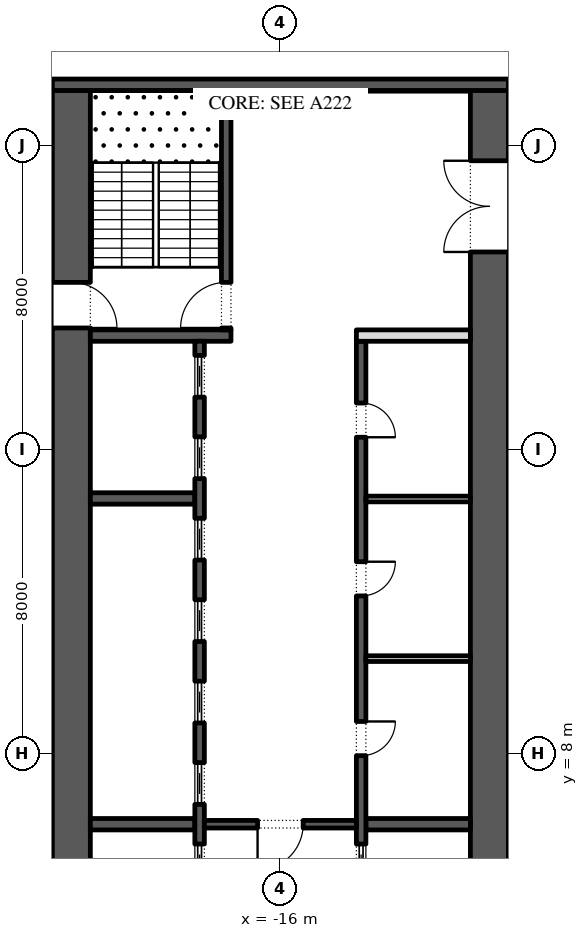
"""IFC4 building model, lengths in metres.
Left out: names, types, materials, properties, quantities, classifications, styles, units other than length and angle.
Written with IfcOpenShell. Run it as: python <this file> out.ifc"""

import sys

from ifc_helpers import new_model, si_unit, direction, frame, frame_2d, origin, place, context, subcontext, project, spatial, rectangle, extrude, element, fill, save


model = new_model("IFC4")
c1 = context("Model", 3, precision=1e-05, world=origin(), true_north=direction((0.0, 1.0)))
c2 = subcontext(c1, "Body", "Model", "MODEL_VIEW")
j1 = project(units=[si_unit("LENGTHUNIT", "METRE"), si_unit("PLANEANGLEUNIT", "RADIAN")], contexts=[c1])
p1 = place(None, origin())
s1 = spatial("IfcSite", under=j1, at=p1, CompositionType="ELEMENT")
p2 = place(p1, origin())
s2 = spatial("IfcBuilding", under=s1, at=p2, CompositionType="ELEMENT")
p3 = place(p2, frame((0.0, 0.0, 90.0)))
s3 = spatial("IfcBuildingStorey", under=s2, at=p3, CompositionType="ELEMENT", Elevation=90.0)
p4 = place(p3, frame((-21.5, -2.45, 0.0), z_axis=(0.0, 0.0, 1.0), x_axis=(0.0, 1.0, 0.0)))
e1 = element("IfcWall", 1, at=p4, inside=s3, PredefinedType="SHEAR", context=c2, shape_type="SweptSolid", body=[
    extrude(rectangle(XDim=27.9, YDim=1.0, at=frame_2d((13.95, 0.0))), origin(), (0.0, 0.0, 1.0), 3.9),
])
p5 = place(p4, frame((5.05, 0.0, 0.0)))
e2 = element("IfcOpeningElement", 2, at=p5, cuts=e1, PredefinedType="OPENING", context=c2, shape_type="SweptSolid", body=[
    extrude(rectangle(XDim=1.2, YDim=2.1, at=frame_2d((0.6, 1.05))), frame((0.0, 0.51, 0.0), z_axis=(0.0, -1.0, 0.0), x_axis=(1.0, 0.0, 0.0)), (0.0, 0.0, 1.0), 1.02),
])
p6 = place(p4, frame((21.65, 0.0, 0.0)))
e3 = element("IfcOpeningElement", 3, at=p6, cuts=e1, PredefinedType="OPENING", context=c2, shape_type="SweptSolid", body=[
    extrude(rectangle(XDim=1.2, YDim=2.1, at=frame_2d((0.6, 1.05))), frame((0.0, 0.51, 0.0), z_axis=(0.0, -1.0, 0.0), x_axis=(1.0, 0.0, 0.0)), (0.0, 0.0, 1.0), 1.02),
])
p7 = place(p3, frame((-10.5, -2.45, 0.0), z_axis=(0.0, 0.0, 1.0), x_axis=(0.0, 1.0, 0.0)))
e4 = element("IfcWall", 4, at=p7, inside=s3, PredefinedType="SHEAR", context=c2, shape_type="SweptSolid", body=[
    extrude(rectangle(XDim=27.9, YDim=1.0, at=frame_2d((13.95, 0.0))), origin(), (0.0, 0.0, 1.0), 3.9),
])
p8 = place(p7, frame((23.65, 0.0, 0.0)))
e5 = element("IfcOpeningElement", 5, at=p8, cuts=e4, PredefinedType="OPENING", context=c2, shape_type="SweptSolid", body=[
    extrude(rectangle(XDim=2.4, YDim=2.1, at=frame_2d((1.2, 1.05))), frame((0.0, 0.51, 0.0), z_axis=(0.0, -1.0, 0.0), x_axis=(1.0, 0.0, 0.0)), (0.0, 0.0, 1.0), 1.02),
])
p9 = place(p7, frame((0.788, 0.0, 0.0)))
e6 = element("IfcOpeningElement", 6, at=p9, cuts=e4, PredefinedType="OPENING", context=c2, shape_type="SweptSolid", body=[
    extrude(rectangle(XDim=0.9, YDim=2.1, at=frame_2d((0.45, 1.05))), frame((0.0, 0.51, 0.0), z_axis=(0.0, -1.0, 0.0), x_axis=(1.0, 0.0, 0.0)), (0.0, 0.0, 1.0), 1.02),
])
p10 = place(p7, frame((4.012, 0.0, 0.0)))
e7 = element("IfcOpeningElement", 7, at=p10, cuts=e4, PredefinedType="OPENING", context=c2, shape_type="SweptSolid", body=[
    extrude(rectangle(XDim=0.9, YDim=2.1, at=frame_2d((0.45, 1.05))), frame((0.0, 0.51, 0.0), z_axis=(0.0, -1.0, 0.0), x_axis=(1.0, 0.0, 0.0)), (0.0, 0.0, 1.0), 1.02),
])
p11 = place(p3, frame((-22.0, 25.6, 0.0), z_axis=(0.0, 0.0, 1.0), x_axis=(1.0, 0.0, 0.0)))
e8 = element("IfcWall", 8, at=p11, inside=s3, PredefinedType="SHEAR", context=c2, shape_type="SweptSolid", body=[
    extrude(rectangle(XDim=12.0, YDim=0.3, at=frame_2d((6.0, 0.0))), origin(), (0.0, 0.0, 1.0), 3.9),
])
p12 = place(p3, frame((-21.0, 19.0, 0.0), z_axis=(0.0, 0.0, 1.0), x_axis=(1.0, 0.0, 0.0)))
e9 = element("IfcWall", 9, at=p12, inside=s3, PredefinedType="SHEAR", context=c2, shape_type="SweptSolid", body=[
    extrude(rectangle(XDim=3.7, YDim=0.3, at=frame_2d((1.85, 0.0))), origin(), (0.0, 0.0, 1.0), 3.9),
])
p13 = place(p3, frame((-17.425, 19.15, 0.0), z_axis=(0.0, 0.0, 1.0), x_axis=(0.0, 1.0, 0.0)))
e10 = element("IfcWall", 10, at=p13, inside=s3, PredefinedType="SHEAR", context=c2, shape_type="SweptSolid", body=[
    extrude(rectangle(XDim=6.3, YDim=0.25, at=frame_2d((3.15, 0.0))), origin(), (0.0, 0.0, 1.0), 3.9),
])
p14 = place(p13, frame((0.05, 0.0, 0.0)))
e11 = element("IfcOpeningElement", 11, at=p14, cuts=e10, PredefinedType="OPENING", context=c2, shape_type="SweptSolid", body=[
    extrude(rectangle(XDim=1.2, YDim=2.1, at=frame_2d((0.6, 1.05))), frame((0.0, 0.135, 0.0), z_axis=(0.0, -1.0, 0.0), x_axis=(1.0, 0.0, 0.0)), (0.0, 0.0, 1.0), 0.27),
])
for number, where, z_axis, x_axis in (
    (12, (-21.0, 6.143, 0.0), (0.0, 0.0, 1.0), (1.0, 0.0, 0.0)),
    (13, (-21.0, 14.714, 0.0), (0.0, 0.0, 1.0), (1.0, 0.0, 0.0)),
):
    element("IfcWall", number, at=place(p3, frame(where, z_axis=z_axis, x_axis=x_axis)), inside=s3, PredefinedType="SHEAR", context=c2, shape_type="SweptSolid", body=[
        extrude(rectangle(XDim=2.75, YDim=0.3, at=frame_2d((1.375, 0.0))), origin(), (0.0, 0.0, 1.0), 3.9),
    ])
p15 = place(p3, frame((-18.125, 4.15, 0.0), z_axis=(0.0, 0.0, 1.0), x_axis=(0.0, 1.0, 0.0)))
e14 = element("IfcWall", 14, at=p15, inside=s3, PredefinedType="SHEAR", context=c2, shape_type="SweptSolid", body=[
    extrude(rectangle(XDim=14.7, YDim=0.25, at=frame_2d((7.35, 0.0))), origin(), (0.0, 0.0, 1.0), 3.9),
])
p16 = place(p15, frame((0.371, 0.0, 0.0)))
e15 = element("IfcOpeningElement", 15, at=p16, cuts=e14, PredefinedType="OPENING", context=c2, shape_type="SweptSolid", body=[
    extrude(rectangle(XDim=1.1, YDim=2.1, at=frame_2d((0.55, 1.05))), frame((0.0, 0.135, 0.0), z_axis=(0.0, -1.0, 0.0), x_axis=(1.0, 0.0, 0.0)), (0.0, 0.0, 1.0), 0.27),
])
p17 = place(p15, frame((2.514, 0.0, 0.0)))
e16 = element("IfcOpeningElement", 16, at=p17, cuts=e14, PredefinedType="OPENING", context=c2, shape_type="SweptSolid", body=[
    extrude(rectangle(XDim=1.1, YDim=2.1, at=frame_2d((0.55, 1.05))), frame((0.0, 0.135, 0.0), z_axis=(0.0, -1.0, 0.0), x_axis=(1.0, 0.0, 0.0)), (0.0, 0.0, 1.0), 0.27),
])
p18 = place(p15, frame((4.657, 0.0, 0.0)))
e17 = element("IfcOpeningElement", 17, at=p18, cuts=e14, PredefinedType="OPENING", context=c2, shape_type="SweptSolid", body=[
    extrude(rectangle(XDim=1.1, YDim=2.1, at=frame_2d((0.55, 1.05))), frame((0.0, 0.135, 0.0), z_axis=(0.0, -1.0, 0.0), x_axis=(1.0, 0.0, 0.0)), (0.0, 0.0, 1.0), 0.27),
])
p19 = place(p15, frame((6.8, 0.0, 0.0)))
e18 = element("IfcOpeningElement", 18, at=p19, cuts=e14, PredefinedType="OPENING", context=c2, shape_type="SweptSolid", body=[
    extrude(rectangle(XDim=1.1, YDim=2.1, at=frame_2d((0.55, 1.05))), frame((0.0, 0.135, 0.0), z_axis=(0.0, -1.0, 0.0), x_axis=(1.0, 0.0, 0.0)), (0.0, 0.0, 1.0), 0.27),
])
p20 = place(p15, frame((8.943, 0.0, 0.0)))
e19 = element("IfcOpeningElement", 19, at=p20, cuts=e14, PredefinedType="OPENING", context=c2, shape_type="SweptSolid", body=[
    extrude(rectangle(XDim=1.1, YDim=2.1, at=frame_2d((0.55, 1.05))), frame((0.0, 0.135, 0.0), z_axis=(0.0, -1.0, 0.0), x_axis=(1.0, 0.0, 0.0)), (0.0, 0.0, 1.0), 0.27),
])
p21 = place(p15, frame((11.086, 0.0, 0.0)))
e20 = element("IfcOpeningElement", 20, at=p21, cuts=e14, PredefinedType="OPENING", context=c2, shape_type="SweptSolid", body=[
    extrude(rectangle(XDim=1.1, YDim=2.1, at=frame_2d((0.55, 1.05))), frame((0.0, 0.135, 0.0), z_axis=(0.0, -1.0, 0.0), x_axis=(1.0, 0.0, 0.0)), (0.0, 0.0, 1.0), 0.27),
])
p22 = place(p15, frame((13.229, 0.0, 0.0)))
e21 = element("IfcOpeningElement", 21, at=p22, cuts=e14, PredefinedType="OPENING", context=c2, shape_type="SweptSolid", body=[
    extrude(rectangle(XDim=1.1, YDim=2.1, at=frame_2d((0.55, 1.05))), frame((0.0, 0.135, 0.0), z_axis=(0.0, -1.0, 0.0), x_axis=(1.0, 0.0, 0.0)), (0.0, 0.0, 1.0), 0.27),
])
p23 = place(p3, frame((-13.75, 6.143, 0.0), z_axis=(0.0, 0.0, 1.0), x_axis=(1.0, 0.0, 0.0)))
e22 = element("IfcWall", 22, at=p23, inside=s3, PredefinedType="SHEAR", context=c2, shape_type="SweptSolid", body=[
    extrude(rectangle(XDim=2.75, YDim=0.3, at=frame_2d((1.375, 0.0))), origin(), (0.0, 0.0, 1.0), 3.9),
])
p24 = place(p3, frame((-13.875, -2.45, 0.0), z_axis=(0.0, 0.0, 1.0), x_axis=(0.0, 1.0, 0.0)))
e23 = element("IfcWall", 23, at=p24, inside=s3, PredefinedType="SHEAR", context=c2, shape_type="SweptSolid", body=[
    extrude(rectangle(XDim=21.3, YDim=0.25, at=frame_2d((10.65, 0.0))), origin(), (0.0, 0.0, 1.0), 3.9),
])
p25 = place(p24, frame((10.396, 0.0, 0.0)))
e24 = element("IfcOpeningElement", 24, at=p25, cuts=e23, PredefinedType="OPENING", context=c2, shape_type="SweptSolid", body=[
    extrude(rectangle(XDim=0.9, YDim=2.1, at=frame_2d((0.45, 1.05))), frame((0.0, 0.135, 0.0), z_axis=(0.0, -1.0, 0.0), x_axis=(1.0, 0.0, 0.0)), (0.0, 0.0, 1.0), 0.27),
])
p26 = place(p24, frame((14.6, 0.0, 0.0)))
e25 = element("IfcOpeningElement", 25, at=p26, cuts=e23, PredefinedType="OPENING", context=c2, shape_type="SweptSolid", body=[
    extrude(rectangle(XDim=0.9, YDim=2.1, at=frame_2d((0.45, 1.05))), frame((0.0, 0.135, 0.0), z_axis=(0.0, -1.0, 0.0), x_axis=(1.0, 0.0, 0.0)), (0.0, 0.0, 1.0), 0.27),
])
p27 = place(p24, frame((18.775, 0.0, 0.0)))
e26 = element("IfcOpeningElement", 26, at=p27, cuts=e23, PredefinedType="OPENING", context=c2, shape_type="SweptSolid", body=[
    extrude(rectangle(XDim=0.9, YDim=2.1, at=frame_2d((0.45, 1.05))), frame((0.0, 0.135, 0.0), z_axis=(0.0, -1.0, 0.0), x_axis=(1.0, 0.0, 0.0)), (0.0, 0.0, 1.0), 0.27),
])
p28 = place(p24, frame((6.971, 0.0, 0.0)))
e27 = element("IfcOpeningElement", 27, at=p28, cuts=e23, PredefinedType="OPENING", context=c2, shape_type="SweptSolid", body=[
    extrude(rectangle(XDim=1.1, YDim=2.1, at=frame_2d((0.55, 1.05))), frame((0.0, 0.135, 0.0), z_axis=(0.0, -1.0, 0.0), x_axis=(1.0, 0.0, 0.0)), (0.0, 0.0, 1.0), 0.27),
])
p29 = place(p3, frame((-14.0, 19.0, 0.0), z_axis=(0.0, 0.0, 1.0), x_axis=(1.0, 0.0, 0.0)))
e28 = element("IfcWall", 28, at=p29, inside=s3, PredefinedType="PARTITIONING", context=c2, shape_type="SweptSolid", body=[
    extrude(rectangle(XDim=3.0, YDim=0.3, at=frame_2d((1.5, 0.0))), origin(), (0.0, 0.0, 1.0), 3.9),
])
for number, where, z_axis, x_axis in (
    (29, (-13.75, 10.5, 0.0), (0.0, 0.0, 1.0), (1.0, 0.0, 0.0)),
    (30, (-13.75, 14.7, 0.0), (0.0, 0.0, 1.0), (1.0, 0.0, 0.0)),
):
    element("IfcWall", number, at=place(p3, frame(where, z_axis=z_axis, x_axis=x_axis)), inside=s3, PredefinedType="PARTITIONING", context=c2, shape_type="SweptSolid", body=[
        extrude(rectangle(XDim=2.75, YDim=0.15, at=frame_2d((1.375, 0.0))), origin(), (0.0, 0.0, 1.0), 3.9),
    ])
p30 = place(p3, frame((-18.0, 6.143, 0.0), z_axis=(0.0, 0.0, 1.0), x_axis=(1.0, 0.0, 0.0)))
e31 = element("IfcWall", 31, at=p30, inside=s3, PredefinedType="SHEAR", context=c2, shape_type="SweptSolid", body=[
    extrude(rectangle(XDim=4.0, YDim=0.2, at=frame_2d((2.0, 0.0))), origin(), (0.0, 0.0, 1.0), 3.9),
])
p31 = place(p30, frame((1.4, 0.0, 0.0)))
e32 = element("IfcOpeningElement", 32, at=p31, cuts=e31, PredefinedType="OPENING", context=c2, shape_type="SweptSolid", body=[
    extrude(rectangle(XDim=1.2, YDim=2.1, at=frame_2d((0.6, 1.05))), frame((0.0, 0.11, 0.0), z_axis=(0.0, -1.0, 0.0), x_axis=(1.0, 0.0, 0.0)), (0.0, 0.0, 1.0), 0.22),
])
p32 = place(p16, origin())
e33 = element("IfcDoor", 33, at=p32, inside=s3, OperationType="SLIDING_TO_LEFT", PredefinedType="DOOR", context=c2, shape_type="SweptSolid", body=[
    extrude(rectangle(XDim=1.1, YDim=2.1, at=frame_2d((0.55, 1.05))), frame((0.0, 0.025, 0.0), z_axis=(0.0, -1.0, 0.0), x_axis=(1.0, 0.0, 0.0)), (0.0, 0.0, 1.0), 0.05),
])
fill(e15, e33)
p33 = place(p17, origin())
e34 = element("IfcDoor", 34, at=p33, inside=s3, OperationType="SLIDING_TO_LEFT", PredefinedType="DOOR", context=c2, shape_type="SweptSolid", body=[
    extrude(rectangle(XDim=1.1, YDim=2.1, at=frame_2d((0.55, 1.05))), frame((0.0, 0.025, 0.0), z_axis=(0.0, -1.0, 0.0), x_axis=(1.0, 0.0, 0.0)), (0.0, 0.0, 1.0), 0.05),
])
fill(e16, e34)
p34 = place(p18, origin())
e35 = element("IfcDoor", 35, at=p34, inside=s3, OperationType="SLIDING_TO_LEFT", PredefinedType="DOOR", context=c2, shape_type="SweptSolid", body=[
    extrude(rectangle(XDim=1.1, YDim=2.1, at=frame_2d((0.55, 1.05))), frame((0.0, 0.025, 0.0), z_axis=(0.0, -1.0, 0.0), x_axis=(1.0, 0.0, 0.0)), (0.0, 0.0, 1.0), 0.05),
])
fill(e17, e35)
p35 = place(p19, origin())
e36 = element("IfcDoor", 36, at=p35, inside=s3, OperationType="SLIDING_TO_LEFT", PredefinedType="DOOR", context=c2, shape_type="SweptSolid", body=[
    extrude(rectangle(XDim=1.1, YDim=2.1, at=frame_2d((0.55, 1.05))), frame((0.0, 0.025, 0.0), z_axis=(0.0, -1.0, 0.0), x_axis=(1.0, 0.0, 0.0)), (0.0, 0.0, 1.0), 0.05),
])
fill(e18, e36)
p36 = place(p20, origin())
e37 = element("IfcDoor", 37, at=p36, inside=s3, OperationType="SLIDING_TO_LEFT", PredefinedType="DOOR", context=c2, shape_type="SweptSolid", body=[
    extrude(rectangle(XDim=1.1, YDim=2.1, at=frame_2d((0.55, 1.05))), frame((0.0, 0.025, 0.0), z_axis=(0.0, -1.0, 0.0), x_axis=(1.0, 0.0, 0.0)), (0.0, 0.0, 1.0), 0.05),
])
fill(e19, e37)
p37 = place(p21, origin())
e38 = element("IfcDoor", 38, at=p37, inside=s3, OperationType="SLIDING_TO_LEFT", PredefinedType="DOOR", context=c2, shape_type="SweptSolid", body=[
    extrude(rectangle(XDim=1.1, YDim=2.1, at=frame_2d((0.55, 1.05))), frame((0.0, 0.025, 0.0), z_axis=(0.0, -1.0, 0.0), x_axis=(1.0, 0.0, 0.0)), (0.0, 0.0, 1.0), 0.05),
])
fill(e20, e38)
p38 = place(p22, origin())
e39 = element("IfcDoor", 39, at=p38, inside=s3, OperationType="SLIDING_TO_LEFT", PredefinedType="DOOR", context=c2, shape_type="SweptSolid", body=[
    extrude(rectangle(XDim=1.1, YDim=2.1, at=frame_2d((0.55, 1.05))), frame((0.0, 0.025, 0.0), z_axis=(0.0, -1.0, 0.0), x_axis=(1.0, 0.0, 0.0)), (0.0, 0.0, 1.0), 0.05),
])
fill(e21, e39)
p39 = place(p25, frame((0.9, -0.2, 0.0), z_axis=(0.0, 0.0, 1.0), x_axis=(-1.0, 0.0, 0.0)))
e40 = element("IfcDoor", 40, at=p39, inside=s3, OperationType="SINGLE_SWING_RIGHT", PredefinedType="DOOR", context=c2, shape_type="SweptSolid", body=[
    extrude(rectangle(XDim=0.9, YDim=2.1, at=frame_2d((0.45, 1.05))), frame((0.0, -0.075, 0.0), z_axis=(0.0, -1.0, 0.0), x_axis=(1.0, 0.0, 0.0)), (0.0, 0.0, 1.0), 0.05),
])
fill(e24, e40)
p40 = place(p26, frame((0.9, -0.2, 0.0), z_axis=(0.0, 0.0, 1.0), x_axis=(-1.0, 0.0, 0.0)))
e41 = element("IfcDoor", 41, at=p40, inside=s3, OperationType="SINGLE_SWING_RIGHT", PredefinedType="DOOR", context=c2, shape_type="SweptSolid", body=[
    extrude(rectangle(XDim=0.9, YDim=2.1, at=frame_2d((0.45, 1.05))), frame((0.0, -0.075, 0.0), z_axis=(0.0, -1.0, 0.0), x_axis=(1.0, 0.0, 0.0)), (0.0, 0.0, 1.0), 0.05),
])
fill(e25, e41)
p41 = place(p27, frame((0.9, -0.2, 0.0), z_axis=(0.0, 0.0, 1.0), x_axis=(-1.0, 0.0, 0.0)))
e42 = element("IfcDoor", 42, at=p41, inside=s3, OperationType="SINGLE_SWING_LEFT", PredefinedType="DOOR", context=c2, shape_type="SweptSolid", body=[
    extrude(rectangle(XDim=0.9, YDim=2.1, at=frame_2d((0.45, 1.05))), frame((0.0, -0.075, 0.0), z_axis=(0.0, -1.0, 0.0), x_axis=(1.0, 0.0, 0.0)), (0.0, 0.0, 1.0), 0.05),
])
fill(e26, e42)
p42 = place(p28, origin())
e43 = element("IfcDoor", 43, at=p42, inside=s3, OperationType="SLIDING_TO_LEFT", PredefinedType="DOOR", context=c2, shape_type="SweptSolid", body=[
    extrude(rectangle(XDim=1.1, YDim=2.1, at=frame_2d((0.55, 1.05))), frame((0.0, 0.025, 0.0), z_axis=(0.0, -1.0, 0.0), x_axis=(1.0, 0.0, 0.0)), (0.0, 0.0, 1.0), 0.05),
])
fill(e27, e43)
p43 = place(p31, frame((1.2, 0.0, 0.0), z_axis=(0.0, 0.0, 1.0), x_axis=(-1.0, 0.0, 0.0)))
e44 = element("IfcDoor", 44, at=p43, inside=s3, OperationType="SINGLE_SWING_LEFT", PredefinedType="DOOR", context=c2, shape_type="SweptSolid", body=[
    extrude(rectangle(XDim=1.2, YDim=2.1, at=frame_2d((0.6, 1.05))), frame((0.0, 0.025, 0.0), z_axis=(0.0, -1.0, 0.0), x_axis=(1.0, 0.0, 0.0)), (0.0, 0.0, 1.0), 0.05),
])
fill(e32, e44)
p44 = place(p8, origin())
e45 = element("IfcDoor", 45, at=p44, inside=s3, OperationType="DOUBLE_DOOR_SINGLE_SWING", PredefinedType="DOOR", context=c2, shape_type="SweptSolid", body=[
    extrude(rectangle(XDim=2.4, YDim=2.1, at=frame_2d((1.2, 1.05))), frame((0.0, 0.025, 0.0), z_axis=(0.0, -1.0, 0.0), x_axis=(1.0, 0.0, 0.0)), (0.0, 0.0, 1.0), 0.05),
])
fill(e5, e45)
p45 = place(p14, origin())
e46 = element("IfcDoor", 46, at=p45, inside=s3, OperationType="SINGLE_SWING_RIGHT", PredefinedType="DOOR", context=c2, shape_type="SweptSolid", body=[
    extrude(rectangle(XDim=1.2, YDim=2.1, at=frame_2d((0.6, 1.05))), frame((0.0, 0.025, 0.0), z_axis=(0.0, -1.0, 0.0), x_axis=(1.0, 0.0, 0.0)), (0.0, 0.0, 1.0), 0.05),
])
fill(e11, e46)
p46 = place(p6, frame((1.2, 0.0, 0.0), z_axis=(0.0, 0.0, 1.0), x_axis=(-1.0, 0.0, 0.0)))
e47 = element("IfcDoor", 47, at=p46, inside=s3, OperationType="SINGLE_SWING_LEFT", PredefinedType="DOOR", context=c2, shape_type="SweptSolid", body=[
    extrude(rectangle(XDim=1.2, YDim=2.1, at=frame_2d((0.6, 1.05))), frame((0.0, 0.025, 0.0), z_axis=(0.0, -1.0, 0.0), x_axis=(1.0, 0.0, 0.0)), (0.0, 0.0, 1.0), 0.05),
])
fill(e3, e47)
save(model, sys.argv[1])
